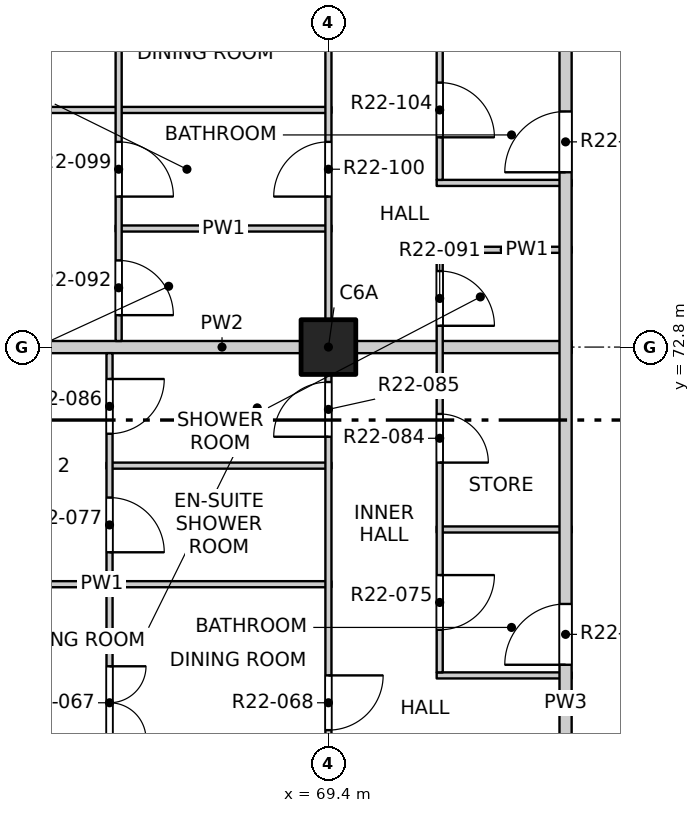
"""IFC4 building model, lengths in metres.
Left out: names, types, materials, properties, quantities, classifications, styles, units other than length and angle.
Written with IfcOpenShell. Run it as: python <this file> out.ifc"""

import sys

from ifc_helpers import new_model, si_unit, direction, frame, frame_2d, origin, origin_2d, place, context, subcontext, project, spatial, rectangle, extrude, element, fill, save


model = new_model("IFC4")
c1 = context("Model", 3, precision=1e-05, world=origin(), true_north=direction((0.0, 1.0)))
c2 = subcontext(c1, "Body", "Model", "MODEL_VIEW")
j1 = project(units=[si_unit("LENGTHUNIT", "METRE"), si_unit("PLANEANGLEUNIT", "RADIAN")], contexts=[c1])
p1 = place(None, origin())
s1 = spatial("IfcSite", under=j1, at=p1, CompositionType="ELEMENT")
p2 = place(p1, origin())
s2 = spatial("IfcBuilding", under=s1, at=p2, CompositionType="ELEMENT")
p3 = place(p2, frame((0.0, 0.0, 231.3)))
s3 = spatial("IfcBuildingStorey", under=s2, at=p3, CompositionType="ELEMENT", Elevation=231.3)
p4 = place(p3, frame((69.4, 72.8, -0.25), z_axis=(0.0, 0.0, 1.0), x_axis=(1.0, 0.0, 0.0)))
e1 = element("IfcColumn", 1, at=p4, inside=s3, PredefinedType="COLUMN", context=c2, shape_type="SweptSolid", body=[
    extrude(rectangle(XDim=0.9, YDim=0.9, at=origin_2d()), origin(), (0.0, 0.0, 1.0), 3.4),
])
p5 = place(p3, frame((71.18, 67.4, 0.0), z_axis=(0.0, 0.0, 1.0), x_axis=(1.0, 0.0, 0.0)))
e2 = element("IfcWall", 2, at=p5, inside=s3, PredefinedType="PARTITIONING", context=c2, shape_type="SweptSolid", body=[
    extrude(rectangle(XDim=2.22, YDim=0.1, at=frame_2d((1.11, 0.0))), origin(), (0.0, 0.0, 1.0), 3.15),
])
p6 = place(p3, frame((61.9, 68.9, 0.0), z_axis=(0.0, 0.0, 1.0), x_axis=(1.0, 0.0, 0.0)))
e3 = element("IfcWall", 3, at=p6, inside=s3, PredefinedType="PARTITIONING", context=c2, shape_type="SweptSolid", body=[
    extrude(rectangle(XDim=7.55, YDim=0.1, at=frame_2d((3.775, 0.0))), origin(), (0.0, 0.0, 1.0), 2.55),
])
p7 = place(p3, frame((71.18, 69.8, 0.0), z_axis=(0.0, 0.0, 1.0), x_axis=(1.0, 0.0, 0.0)))
e4 = element("IfcWall", 4, at=p7, inside=s3, PredefinedType="PARTITIONING", context=c2, shape_type="SweptSolid", body=[
    extrude(rectangle(XDim=2.22, YDim=0.1, at=frame_2d((1.11, 0.0))), origin(), (0.0, 0.0, 1.0), 3.15),
])
p8 = place(p3, frame((65.75, 70.85, 0.0), z_axis=(0.0, 0.0, 1.0), x_axis=(1.0, 0.0, 0.0)))
e5 = element("IfcWall", 5, at=p8, inside=s3, PredefinedType="PARTITIONING", context=c2, shape_type="SweptSolid", body=[
    extrude(rectangle(XDim=3.7, YDim=0.1, at=frame_2d((1.85, 0.0))), origin(), (0.0, 0.0, 1.0), 3.15),
])
p9 = place(p3, frame((61.9, 72.8, 0.0), z_axis=(0.0, 0.0, 1.0), x_axis=(1.0, 0.0, 0.0)))
e6 = element("IfcWall", 6, at=p9, inside=s3, PredefinedType="PARTITIONING", context=c2, shape_type="SweptSolid", body=[
    extrude(rectangle(XDim=11.5, YDim=0.2, at=frame_2d((5.75, 0.0))), origin(), (0.0, 0.0, 1.0), 3.15),
])
p10 = place(p3, frame((71.18, 74.4, 0.0), z_axis=(0.0, 0.0, 1.0), x_axis=(1.0, 0.0, 0.0)))
e7 = element("IfcWall", 7, at=p10, inside=s3, PredefinedType="PARTITIONING", context=c2, shape_type="SweptSolid", body=[
    extrude(rectangle(XDim=2.22, YDim=0.1, at=frame_2d((1.11, 0.0))), origin(), (0.0, 0.0, 1.0), 3.15),
])
p11 = place(p3, frame((65.9, 74.75, 0.0), z_axis=(0.0, 0.0, 1.0), x_axis=(1.0, 0.0, 0.0)))
e8 = element("IfcWall", 8, at=p11, inside=s3, PredefinedType="PARTITIONING", context=c2, shape_type="SweptSolid", body=[
    extrude(rectangle(XDim=3.55, YDim=0.1, at=frame_2d((1.775, 0.0))), origin(), (0.0, 0.0, 1.0), 3.15),
])
p12 = place(p3, frame((71.18, 75.5, 0.0), z_axis=(0.0, 0.0, 1.0), x_axis=(1.0, 0.0, 0.0)))
e9 = element("IfcWall", 9, at=p12, inside=s3, PredefinedType="PARTITIONING", context=c2, shape_type="SweptSolid", body=[
    extrude(rectangle(XDim=2.22, YDim=0.1, at=frame_2d((1.11, 0.0))), origin(), (0.0, 0.0, 1.0), 3.15),
])
p13 = place(p3, frame((61.9, 76.7, 0.0), z_axis=(0.0, 0.0, 1.0), x_axis=(1.0, 0.0, 0.0)))
e10 = element("IfcWall", 10, at=p13, inside=s3, PredefinedType="PARTITIONING", context=c2, shape_type="SweptSolid", body=[
    extrude(rectangle(XDim=7.55, YDim=0.1, at=frame_2d((3.775, 0.0))), origin(), (0.0, 0.0, 1.0), 2.55),
])
p14 = place(p3, frame((65.8, 61.2, 0.0), z_axis=(0.0, 0.0, 1.0), x_axis=(0.0, 1.0, 0.0)))
e11 = element("IfcWall", 11, at=p14, inside=s3, PredefinedType="PARTITIONING", context=c2, shape_type="SweptSolid", body=[
    extrude(rectangle(XDim=11.5, YDim=0.1, at=frame_2d((5.75, 0.0))), origin(), (0.0, 0.0, 1.0), 3.15),
])
p15 = place(p14, frame((0.425, 0.0, 0.0)))
e12 = element("IfcOpeningElement", 12, at=p15, cuts=e11, PredefinedType="OPENING", context=c2, shape_type="SweptSolid", body=[
    extrude(rectangle(XDim=0.9, YDim=2.1, at=frame_2d((0.45, 1.05))), frame((0.0, 0.06, 0.0), z_axis=(0.0, -1.0, 0.0), x_axis=(1.0, 0.0, 0.0)), (0.0, 0.0, 1.0), 0.12),
])
p16 = place(p14, frame((2.375, 0.0, 0.0)))
e13 = element("IfcOpeningElement", 13, at=p16, cuts=e11, PredefinedType="OPENING", context=c2, shape_type="SweptSolid", body=[
    extrude(rectangle(XDim=0.9, YDim=2.1, at=frame_2d((0.45, 1.05))), frame((0.0, 0.06, 0.0), z_axis=(0.0, -1.0, 0.0), x_axis=(1.0, 0.0, 0.0)), (0.0, 0.0, 1.0), 0.12),
])
p17 = place(p14, frame((5.15, 0.0, 0.0)))
e14 = element("IfcOpeningElement", 14, at=p17, cuts=e11, PredefinedType="OPENING", context=c2, shape_type="SweptSolid", body=[
    extrude(rectangle(XDim=1.2, YDim=2.1, at=frame_2d((0.6, 1.05))), frame((0.0, 0.06, 0.0), z_axis=(0.0, -1.0, 0.0), x_axis=(1.0, 0.0, 0.0)), (0.0, 0.0, 1.0), 0.12),
])
p18 = place(p14, frame((8.225, 0.0, 0.0)))
e15 = element("IfcOpeningElement", 15, at=p18, cuts=e11, PredefinedType="OPENING", context=c2, shape_type="SweptSolid", body=[
    extrude(rectangle(XDim=0.9, YDim=2.1, at=frame_2d((0.45, 1.05))), frame((0.0, 0.06, 0.0), z_axis=(0.0, -1.0, 0.0), x_axis=(1.0, 0.0, 0.0)), (0.0, 0.0, 1.0), 0.12),
])
p19 = place(p14, frame((10.175, 0.0, 0.0)))
e16 = element("IfcOpeningElement", 16, at=p19, cuts=e11, PredefinedType="OPENING", context=c2, shape_type="SweptSolid", body=[
    extrude(rectangle(XDim=0.9, YDim=2.1, at=frame_2d((0.45, 1.05))), frame((0.0, 0.06, 0.0), z_axis=(0.0, -1.0, 0.0), x_axis=(1.0, 0.0, 0.0)), (0.0, 0.0, 1.0), 0.12),
])
p20 = place(p3, frame((65.95, 72.9, 0.0), z_axis=(0.0, 0.0, 1.0), x_axis=(0.0, 1.0, 0.0)))
e17 = element("IfcWall", 17, at=p20, inside=s3, PredefinedType="PARTITIONING", context=c2, shape_type="SweptSolid", body=[
    extrude(rectangle(XDim=15.2, YDim=0.1, at=frame_2d((7.6, 0.0))), origin(), (0.0, 0.0, 1.0), 3.15),
])
p21 = place(p20, frame((0.425, 0.0, 0.0)))
e18 = element("IfcOpeningElement", 18, at=p21, cuts=e17, PredefinedType="OPENING", context=c2, shape_type="SweptSolid", body=[
    extrude(rectangle(XDim=0.9, YDim=2.1, at=frame_2d((0.45, 1.05))), frame((0.0, 0.06, 0.0), z_axis=(0.0, -1.0, 0.0), x_axis=(1.0, 0.0, 0.0)), (0.0, 0.0, 1.0), 0.12),
])
p22 = place(p20, frame((2.375, 0.0, 0.0)))
e19 = element("IfcOpeningElement", 19, at=p22, cuts=e17, PredefinedType="OPENING", context=c2, shape_type="SweptSolid", body=[
    extrude(rectangle(XDim=0.9, YDim=2.1, at=frame_2d((0.45, 1.05))), frame((0.0, 0.06, 0.0), z_axis=(0.0, -1.0, 0.0), x_axis=(1.0, 0.0, 0.0)), (0.0, 0.0, 1.0), 0.12),
])
p23 = place(p20, frame((5.15, 0.0, 0.0)))
e20 = element("IfcOpeningElement", 20, at=p23, cuts=e17, PredefinedType="OPENING", context=c2, shape_type="SweptSolid", body=[
    extrude(rectangle(XDim=1.2, YDim=2.1, at=frame_2d((0.6, 1.05))), frame((0.0, 0.06, 0.0), z_axis=(0.0, -1.0, 0.0), x_axis=(1.0, 0.0, 0.0)), (0.0, 0.0, 1.0), 0.12),
])
p24 = place(p20, frame((8.225, 0.0, 0.0)))
e21 = element("IfcOpeningElement", 21, at=p24, cuts=e17, PredefinedType="OPENING", context=c2, shape_type="SweptSolid", body=[
    extrude(rectangle(XDim=0.9, YDim=2.1, at=frame_2d((0.45, 1.05))), frame((0.0, 0.06, 0.0), z_axis=(0.0, -1.0, 0.0), x_axis=(1.0, 0.0, 0.0)), (0.0, 0.0, 1.0), 0.12),
])
p25 = place(p20, frame((10.175, 0.0, 0.0)))
e22 = element("IfcOpeningElement", 22, at=p25, cuts=e17, PredefinedType="OPENING", context=c2, shape_type="SweptSolid", body=[
    extrude(rectangle(XDim=0.9, YDim=2.1, at=frame_2d((0.45, 1.05))), frame((0.0, 0.06, 0.0), z_axis=(0.0, -1.0, 0.0), x_axis=(1.0, 0.0, 0.0)), (0.0, 0.0, 1.0), 0.12),
])
p26 = place(p20, frame((12.95, 0.0, 0.0)))
e23 = element("IfcOpeningElement", 23, at=p26, cuts=e17, PredefinedType="OPENING", context=c2, shape_type="SweptSolid", body=[
    extrude(rectangle(XDim=1.2, YDim=2.1, at=frame_2d((0.6, 1.05))), frame((0.0, 0.06, 0.0), z_axis=(0.0, -1.0, 0.0), x_axis=(1.0, 0.0, 0.0)), (0.0, 0.0, 1.0), 0.12),
])
p27 = place(p3, frame((69.4, 41.9, 0.0), z_axis=(0.0, 0.0, 1.0), x_axis=(0.0, 1.0, 0.0)))
e24 = element("IfcWall", 24, at=p27, inside=s3, PredefinedType="PARTITIONING", context=c2, shape_type="SweptSolid", body=[
    extrude(rectangle(XDim=46.2, YDim=0.1, at=frame_2d((23.1, 0.0))), origin(), (0.0, 0.0, 1.0), 3.15),
])
p28 = place(p27, frame((1.2, 0.0, 0.0)))
e25 = element("IfcOpeningElement", 25, at=p28, cuts=e24, PredefinedType="OPENING", context=c2, shape_type="SweptSolid", body=[
    extrude(rectangle(XDim=0.9, YDim=2.1, at=frame_2d((0.45, 1.05))), frame((0.0, 0.06, 0.0), z_axis=(0.0, -1.0, 0.0), x_axis=(1.0, 0.0, 0.0)), (0.0, 0.0, 1.0), 0.12),
])
p29 = place(p27, frame((5.1, 0.0, 0.0)))
e26 = element("IfcOpeningElement", 26, at=p29, cuts=e24, PredefinedType="OPENING", context=c2, shape_type="SweptSolid", body=[
    extrude(rectangle(XDim=0.9, YDim=2.1, at=frame_2d((0.45, 1.05))), frame((0.0, 0.06, 0.0), z_axis=(0.0, -1.0, 0.0), x_axis=(1.0, 0.0, 0.0)), (0.0, 0.0, 1.0), 0.12),
])
p30 = place(p27, frame((9.0, 0.0, 0.0)))
e27 = element("IfcOpeningElement", 27, at=p30, cuts=e24, PredefinedType="OPENING", context=c2, shape_type="SweptSolid", body=[
    extrude(rectangle(XDim=0.9, YDim=2.1, at=frame_2d((0.45, 1.05))), frame((0.0, 0.06, 0.0), z_axis=(0.0, -1.0, 0.0), x_axis=(1.0, 0.0, 0.0)), (0.0, 0.0, 1.0), 0.12),
])
p31 = place(p27, frame((13.85, 0.0, 0.0)))
e28 = element("IfcOpeningElement", 28, at=p31, cuts=e24, PredefinedType="OPENING", context=c2, shape_type="SweptSolid", body=[
    extrude(rectangle(XDim=0.9, YDim=2.1, at=frame_2d((0.45, 1.05))), frame((0.0, 0.06, 0.0), z_axis=(0.0, -1.0, 0.0), x_axis=(1.0, 0.0, 0.0)), (0.0, 0.0, 1.0), 0.12),
])
p32 = place(p27, frame((17.775, 0.0, 0.0)))
e29 = element("IfcOpeningElement", 29, at=p32, cuts=e24, PredefinedType="OPENING", context=c2, shape_type="SweptSolid", body=[
    extrude(rectangle(XDim=0.9, YDim=2.1, at=frame_2d((0.45, 1.05))), frame((0.0, 0.06, 0.0), z_axis=(0.0, -1.0, 0.0), x_axis=(1.0, 0.0, 0.0)), (0.0, 0.0, 1.0), 0.12),
])
p33 = place(p27, frame((21.625, 0.0, 0.0)))
e30 = element("IfcOpeningElement", 30, at=p33, cuts=e24, PredefinedType="OPENING", context=c2, shape_type="SweptSolid", body=[
    extrude(rectangle(XDim=0.9, YDim=2.1, at=frame_2d((0.45, 1.05))), frame((0.0, 0.06, 0.0), z_axis=(0.0, -1.0, 0.0), x_axis=(1.0, 0.0, 0.0)), (0.0, 0.0, 1.0), 0.12),
])
p34 = place(p27, frame((24.6, 0.0, 0.0)))
e31 = element("IfcOpeningElement", 31, at=p34, cuts=e24, PredefinedType="OPENING", context=c2, shape_type="SweptSolid", body=[
    extrude(rectangle(XDim=0.9, YDim=2.1, at=frame_2d((0.45, 1.05))), frame((0.0, 0.06, 0.0), z_axis=(0.0, -1.0, 0.0), x_axis=(1.0, 0.0, 0.0)), (0.0, 0.0, 1.0), 0.12),
])
p35 = place(p27, frame((29.425, 0.0, 0.0)))
e32 = element("IfcOpeningElement", 32, at=p35, cuts=e24, PredefinedType="OPENING", context=c2, shape_type="SweptSolid", body=[
    extrude(rectangle(XDim=0.9, YDim=2.1, at=frame_2d((0.45, 1.05))), frame((0.0, 0.06, 0.0), z_axis=(0.0, -1.0, 0.0), x_axis=(1.0, 0.0, 0.0)), (0.0, 0.0, 1.0), 0.12),
])
p36 = place(p27, frame((33.375, 0.0, 0.0)))
e33 = element("IfcOpeningElement", 33, at=p36, cuts=e24, PredefinedType="OPENING", context=c2, shape_type="SweptSolid", body=[
    extrude(rectangle(XDim=0.9, YDim=2.1, at=frame_2d((0.45, 1.05))), frame((0.0, 0.06, 0.0), z_axis=(0.0, -1.0, 0.0), x_axis=(1.0, 0.0, 0.0)), (0.0, 0.0, 1.0), 0.12),
])
p37 = place(p27, frame((36.3, 0.0, 0.0)))
e34 = element("IfcOpeningElement", 34, at=p37, cuts=e24, PredefinedType="OPENING", context=c2, shape_type="SweptSolid", body=[
    extrude(rectangle(XDim=0.9, YDim=2.1, at=frame_2d((0.45, 1.05))), frame((0.0, 0.06, 0.0), z_axis=(0.0, -1.0, 0.0), x_axis=(1.0, 0.0, 0.0)), (0.0, 0.0, 1.0), 0.12),
])
p38 = place(p27, frame((41.175, 0.0, 0.0)))
e35 = element("IfcOpeningElement", 35, at=p38, cuts=e24, PredefinedType="OPENING", context=c2, shape_type="SweptSolid", body=[
    extrude(rectangle(XDim=0.9, YDim=2.1, at=frame_2d((0.45, 1.05))), frame((0.0, 0.06, 0.0), z_axis=(0.0, -1.0, 0.0), x_axis=(1.0, 0.0, 0.0)), (0.0, 0.0, 1.0), 0.12),
])
p39 = place(p27, frame((44.1, 0.0, 0.0)))
e36 = element("IfcOpeningElement", 36, at=p39, cuts=e24, PredefinedType="OPENING", context=c2, shape_type="SweptSolid", body=[
    extrude(rectangle(XDim=0.9, YDim=2.1, at=frame_2d((0.45, 1.05))), frame((0.0, 0.06, 0.0), z_axis=(0.0, -1.0, 0.0), x_axis=(1.0, 0.0, 0.0)), (0.0, 0.0, 1.0), 0.12),
])
p40 = place(p3, frame((71.23, 67.45, 0.0), z_axis=(0.0, 0.0, 1.0), x_axis=(0.0, 1.0, 0.0)))
e37 = element("IfcWall", 37, at=p40, inside=s3, PredefinedType="PARTITIONING", context=c2, shape_type="SweptSolid", body=[
    extrude(rectangle(XDim=6.9, YDim=0.1, at=frame_2d((3.45, 0.0))), origin(), (0.0, 0.0, 1.0), 3.15),
])
p41 = place(p40, frame((0.7, 0.0, 0.0)))
e38 = element("IfcOpeningElement", 38, at=p41, cuts=e37, PredefinedType="OPENING", context=c2, shape_type="SweptSolid", body=[
    extrude(rectangle(XDim=0.9, YDim=2.1, at=frame_2d((0.45, 1.05))), frame((0.0, 0.06, 0.0), z_axis=(0.0, -1.0, 0.0), x_axis=(1.0, 0.0, 0.0)), (0.0, 0.0, 1.0), 0.12),
])
p42 = place(p40, frame((3.45, 0.0, 0.0)))
e39 = element("IfcOpeningElement", 39, at=p42, cuts=e37, PredefinedType="OPENING", context=c2, shape_type="SweptSolid", body=[
    extrude(rectangle(XDim=0.8, YDim=2.1, at=frame_2d((0.4, 1.05))), frame((0.0, 0.06, 0.0), z_axis=(0.0, -1.0, 0.0), x_axis=(1.0, 0.0, 0.0)), (0.0, 0.0, 1.0), 0.12),
])
p43 = place(p40, frame((5.7, 0.0, 0.0)))
e40 = element("IfcOpeningElement", 40, at=p43, cuts=e37, PredefinedType="OPENING", context=c2, shape_type="SweptSolid", body=[
    extrude(rectangle(XDim=0.9, YDim=2.1, at=frame_2d((0.45, 1.05))), frame((0.0, 0.06, 0.0), z_axis=(0.0, -1.0, 0.0), x_axis=(1.0, 0.0, 0.0)), (0.0, 0.0, 1.0), 0.12),
])
p44 = place(p3, frame((71.23, 75.55, 0.0), z_axis=(0.0, 0.0, 1.0), x_axis=(0.0, 1.0, 0.0)))
e41 = element("IfcWall", 41, at=p44, inside=s3, PredefinedType="PARTITIONING", context=c2, shape_type="SweptSolid", body=[
    extrude(rectangle(XDim=8.9, YDim=0.1, at=frame_2d((4.45, 0.0))), origin(), (0.0, 0.0, 1.0), 3.15),
])
p45 = place(p44, frame((0.7, 0.0, 0.0)))
e42 = element("IfcOpeningElement", 42, at=p45, cuts=e41, PredefinedType="OPENING", context=c2, shape_type="SweptSolid", body=[
    extrude(rectangle(XDim=0.9, YDim=2.1, at=frame_2d((0.45, 1.05))), frame((0.0, 0.06, 0.0), z_axis=(0.0, -1.0, 0.0), x_axis=(1.0, 0.0, 0.0)), (0.0, 0.0, 1.0), 0.12),
])
p46 = place(p44, frame((3.75, 0.0, 0.0)))
e43 = element("IfcOpeningElement", 43, at=p46, cuts=e41, PredefinedType="OPENING", context=c2, shape_type="SweptSolid", body=[
    extrude(rectangle(XDim=0.9, YDim=2.1, at=frame_2d((0.45, 1.05))), frame((0.0, 0.06, 0.0), z_axis=(0.0, -1.0, 0.0), x_axis=(1.0, 0.0, 0.0)), (0.0, 0.0, 1.0), 0.12),
])
p47 = place(p44, frame((7.1, 0.0, 0.0)))
e44 = element("IfcOpeningElement", 44, at=p47, cuts=e41, PredefinedType="OPENING", context=c2, shape_type="SweptSolid", body=[
    extrude(rectangle(XDim=0.8, YDim=2.1, at=frame_2d((0.4, 1.05))), frame((0.0, 0.06, 0.0), z_axis=(0.0, -1.0, 0.0), x_axis=(1.0, 0.0, 0.0)), (0.0, 0.0, 1.0), 0.12),
])
p48 = place(p3, frame((73.3, 49.5, 0.0), z_axis=(0.0, 0.0, 1.0), x_axis=(0.0, 1.0, 0.0)))
e45 = element("IfcWall", 45, at=p48, inside=s3, PredefinedType="PARTITIONING", context=c2, shape_type="SweptSolid", body=[
    extrude(rectangle(XDim=34.9, YDim=0.2, at=frame_2d((17.45, 0.0))), origin(), (0.0, 0.0, 1.0), 3.15),
])
p49 = place(p48, frame((3.575, 0.0, 0.0)))
e46 = element("IfcOpeningElement", 46, at=p49, cuts=e45, PredefinedType="OPENING", context=c2, shape_type="SweptSolid", body=[
    extrude(rectangle(XDim=1.0, YDim=2.1, at=frame_2d((0.5, 1.05))), frame((0.0, 0.11, 0.0), z_axis=(0.0, -1.0, 0.0), x_axis=(1.0, 0.0, 0.0)), (0.0, 0.0, 1.0), 0.22),
])
p50 = place(p48, frame((18.075, 0.0, 0.0)))
e47 = element("IfcOpeningElement", 47, at=p50, cuts=e45, PredefinedType="OPENING", context=c2, shape_type="SweptSolid", body=[
    extrude(rectangle(XDim=1.0, YDim=2.1, at=frame_2d((0.5, 1.05))), frame((0.0, 0.11, 0.0), z_axis=(0.0, -1.0, 0.0), x_axis=(1.0, 0.0, 0.0)), (0.0, 0.0, 1.0), 0.22),
])
p51 = place(p48, frame((26.175, 0.0, 0.0)))
e48 = element("IfcOpeningElement", 48, at=p51, cuts=e45, PredefinedType="OPENING", context=c2, shape_type="SweptSolid", body=[
    extrude(rectangle(XDim=1.0, YDim=2.1, at=frame_2d((0.5, 1.05))), frame((0.0, 0.11, 0.0), z_axis=(0.0, -1.0, 0.0), x_axis=(1.0, 0.0, 0.0)), (0.0, 0.0, 1.0), 0.22),
])
p52 = place(p17, origin())
e49 = element("IfcDoor", 49, at=p52, inside=s3, OperationType="DOUBLE_DOOR_SINGLE_SWING", PredefinedType="DOOR", context=c2, shape_type="SweptSolid", body=[
    extrude(rectangle(XDim=1.2, YDim=2.1, at=frame_2d((0.6, 1.05))), frame((0.0, 0.025, 0.0), z_axis=(0.0, -1.0, 0.0), x_axis=(1.0, 0.0, 0.0)), (0.0, 0.0, 1.0), 0.05),
])
fill(e14, e49)
p53 = place(p34, origin())
e50 = element("IfcDoor", 50, at=p53, inside=s3, OperationType="SINGLE_SWING_LEFT", PredefinedType="DOOR", context=c2, shape_type="SweptSolid", body=[
    extrude(rectangle(XDim=0.9, YDim=2.1, at=frame_2d((0.45, 1.05))), frame((0.0, 0.025, 0.0), z_axis=(0.0, -1.0, 0.0), x_axis=(1.0, 0.0, 0.0)), (0.0, 0.0, 1.0), 0.05),
])
fill(e31, e50)
p54 = place(p50, origin())
e51 = element("IfcDoor", 51, at=p54, inside=s3, OperationType="SINGLE_SWING_RIGHT", PredefinedType="DOOR", context=c2, shape_type="SweptSolid", body=[
    extrude(rectangle(XDim=1.0, YDim=2.1, at=frame_2d((0.5, 1.05))), frame((0.0, 0.025, 0.0), z_axis=(0.0, -1.0, 0.0), x_axis=(1.0, 0.0, 0.0)), (0.0, 0.0, 1.0), 0.05),
])
fill(e47, e51)
p55 = place(p41, origin())
e52 = element("IfcDoor", 52, at=p55, inside=s3, OperationType="SINGLE_SWING_LEFT", PredefinedType="DOOR", context=c2, shape_type="SweptSolid", body=[
    extrude(rectangle(XDim=0.9, YDim=2.1, at=frame_2d((0.45, 1.05))), frame((0.0, 0.025, 0.0), z_axis=(0.0, -1.0, 0.0), x_axis=(1.0, 0.0, 0.0)), (0.0, 0.0, 1.0), 0.05),
])
fill(e38, e52)
p56 = place(p18, origin())
e53 = element("IfcDoor", 53, at=p56, inside=s3, OperationType="SINGLE_SWING_RIGHT", PredefinedType="DOOR", context=c2, shape_type="SweptSolid", body=[
    extrude(rectangle(XDim=0.9, YDim=2.1, at=frame_2d((0.45, 1.05))), frame((0.0, 0.025, 0.0), z_axis=(0.0, -1.0, 0.0), x_axis=(1.0, 0.0, 0.0)), (0.0, 0.0, 1.0), 0.05),
])
fill(e15, e53)
p57 = place(p42, origin())
e54 = element("IfcDoor", 54, at=p57, inside=s3, OperationType="SINGLE_SWING_RIGHT", PredefinedType="DOOR", context=c2, shape_type="SweptSolid", body=[
    extrude(rectangle(XDim=0.8, YDim=2.1, at=frame_2d((0.4, 1.05))), frame((0.0, 0.025, 0.0), z_axis=(0.0, -1.0, 0.0), x_axis=(1.0, 0.0, 0.0)), (0.0, 0.0, 1.0), 0.05),
])
fill(e39, e54)
p58 = place(p35, origin())
e55 = element("IfcDoor", 55, at=p58, inside=s3, OperationType="SINGLE_SWING_LEFT", PredefinedType="DOOR", context=c2, shape_type="SweptSolid", body=[
    extrude(rectangle(XDim=0.9, YDim=2.1, at=frame_2d((0.45, 1.05))), frame((0.0, 0.025, 0.0), z_axis=(0.0, -1.0, 0.0), x_axis=(1.0, 0.0, 0.0)), (0.0, 0.0, 1.0), 0.05),
])
fill(e32, e55)
p59 = place(p19, origin())
e56 = element("IfcDoor", 56, at=p59, inside=s3, OperationType="SINGLE_SWING_LEFT", PredefinedType="DOOR", context=c2, shape_type="SweptSolid", body=[
    extrude(rectangle(XDim=0.9, YDim=2.1, at=frame_2d((0.45, 1.05))), frame((0.0, 0.025, 0.0), z_axis=(0.0, -1.0, 0.0), x_axis=(1.0, 0.0, 0.0)), (0.0, 0.0, 1.0), 0.05),
])
fill(e16, e56)
p60 = place(p43, origin())
e57 = element("IfcDoor", 57, at=p60, inside=s3, OperationType="SINGLE_SWING_RIGHT", PredefinedType="DOOR", context=c2, shape_type="SweptSolid", body=[
    extrude(rectangle(XDim=0.9, YDim=2.1, at=frame_2d((0.45, 1.05))), frame((0.0, 0.025, 0.0), z_axis=(0.0, -1.0, 0.0), x_axis=(1.0, 0.0, 0.0)), (0.0, 0.0, 1.0), 0.05),
])
fill(e40, e57)
p61 = place(p21, origin())
e58 = element("IfcDoor", 58, at=p61, inside=s3, OperationType="SINGLE_SWING_RIGHT", PredefinedType="DOOR", context=c2, shape_type="SweptSolid", body=[
    extrude(rectangle(XDim=0.9, YDim=2.1, at=frame_2d((0.45, 1.05))), frame((0.0, 0.025, 0.0), z_axis=(0.0, -1.0, 0.0), x_axis=(1.0, 0.0, 0.0)), (0.0, 0.0, 1.0), 0.05),
])
fill(e18, e58)
p62 = place(p22, origin())
e59 = element("IfcDoor", 59, at=p62, inside=s3, OperationType="SINGLE_SWING_RIGHT", PredefinedType="DOOR", context=c2, shape_type="SweptSolid", body=[
    extrude(rectangle(XDim=0.9, YDim=2.1, at=frame_2d((0.45, 1.05))), frame((0.0, 0.025, 0.0), z_axis=(0.0, -1.0, 0.0), x_axis=(1.0, 0.0, 0.0)), (0.0, 0.0, 1.0), 0.05),
])
fill(e19, e59)
p63 = place(p36, origin())
e60 = element("IfcDoor", 60, at=p63, inside=s3, OperationType="SINGLE_SWING_LEFT", PredefinedType="DOOR", context=c2, shape_type="SweptSolid", body=[
    extrude(rectangle(XDim=0.9, YDim=2.1, at=frame_2d((0.45, 1.05))), frame((0.0, 0.025, 0.0), z_axis=(0.0, -1.0, 0.0), x_axis=(1.0, 0.0, 0.0)), (0.0, 0.0, 1.0), 0.05),
])
fill(e33, e60)
p64 = place(p51, origin())
e61 = element("IfcDoor", 61, at=p64, inside=s3, OperationType="SINGLE_SWING_RIGHT", PredefinedType="DOOR", context=c2, shape_type="SweptSolid", body=[
    extrude(rectangle(XDim=1.0, YDim=2.1, at=frame_2d((0.5, 1.05))), frame((0.0, 0.025, 0.0), z_axis=(0.0, -1.0, 0.0), x_axis=(1.0, 0.0, 0.0)), (0.0, 0.0, 1.0), 0.05),
])
fill(e48, e61)
p65 = place(p45, origin())
e62 = element("IfcDoor", 62, at=p65, inside=s3, OperationType="SINGLE_SWING_RIGHT", PredefinedType="DOOR", context=c2, shape_type="SweptSolid", body=[
    extrude(rectangle(XDim=0.9, YDim=2.1, at=frame_2d((0.45, 1.05))), frame((0.0, 0.025, 0.0), z_axis=(0.0, -1.0, 0.0), x_axis=(1.0, 0.0, 0.0)), (0.0, 0.0, 1.0), 0.05),
])
fill(e42, e62)
save(model, sys.argv[1])
